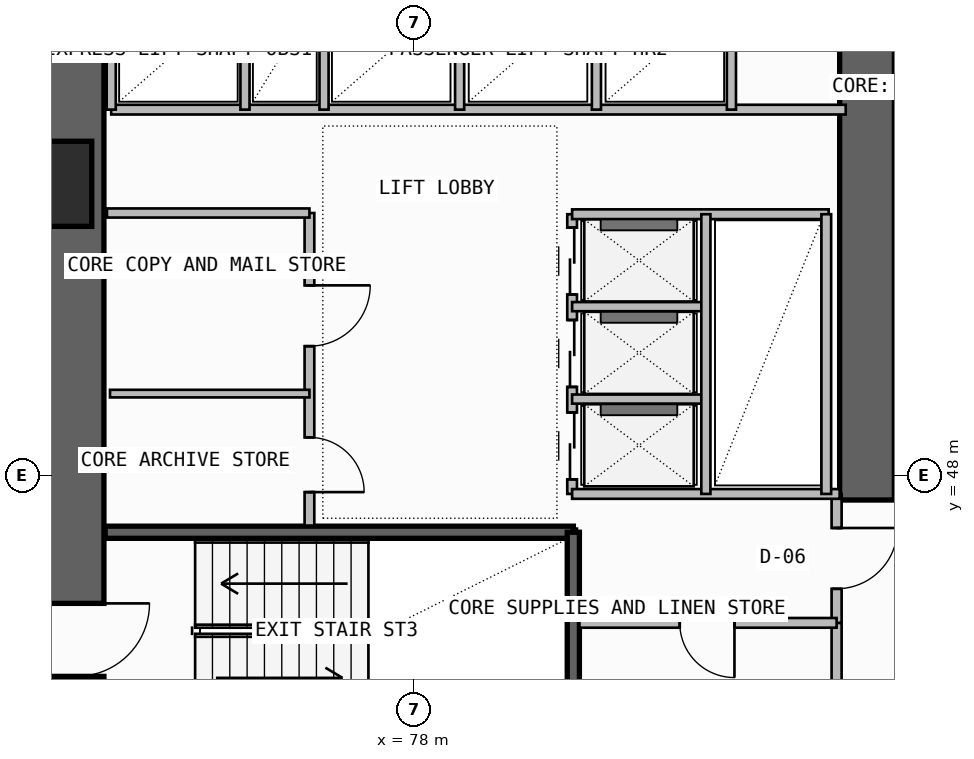
"""IFC4 building model, lengths in metres.
Left out: names, types, materials, properties, quantities, classifications, styles, units other than length and angle.
Written with IfcOpenShell. Run it as: python <this file> out.ifc"""

import sys

from ifc_helpers import new_model, si_unit, direction, frame, frame_2d, origin, origin_2d, place, context, subcontext, project, spatial, rectangle, extrude, element, fill, save


model = new_model("IFC4")
c1 = context("Model", 3, precision=1e-05, world=origin(), true_north=direction((0.0, 1.0)))
c2 = subcontext(c1, "Body", "Model", "MODEL_VIEW")
j1 = project(units=[si_unit("LENGTHUNIT", "METRE"), si_unit("PLANEANGLEUNIT", "RADIAN")], contexts=[c1])
p1 = place(None, origin())
s1 = spatial("IfcSite", under=j1, at=p1, CompositionType="ELEMENT")
p2 = place(p1, origin())
s2 = spatial("IfcBuilding", under=s1, at=p2, CompositionType="ELEMENT")
p3 = place(p2, frame((0.0, 0.0, 157.5)))
s3 = spatial("IfcBuildingStorey", under=s2, at=p3, CompositionType="ELEMENT", Elevation=157.5)
p4 = place(p3, frame((72.45, 43.35, -0.26), z_axis=(0.0, 0.0, 1.0), x_axis=(0.0, 1.0, 0.0)))
e1 = element("IfcWall", 1, at=p4, inside=s3, PredefinedType="SHEAR", context=c2, shape_type="SweptSolid", body=[
    extrude(rectangle(XDim=12.7, YDim=0.9, at=frame_2d((6.35, 0.0))), origin(), (0.0, 0.0, 1.0), 3.6),
])
p5 = place(p4, frame((1.35, 0.0, 0.26)))
e2 = element("IfcOpeningElement", 2, at=p5, cuts=e1, PredefinedType="OPENING", context=c2, shape_type="SweptSolid", body=[
    extrude(rectangle(XDim=1.2, YDim=2.2, at=frame_2d((0.6, 1.1))), frame((0.0, 0.46, 0.0), z_axis=(0.0, -1.0, 0.0), x_axis=(1.0, 0.0, 0.0)), (0.0, 0.0, 1.0), 0.92),
])
p6 = place(p3, frame((85.45, 47.6, -0.26), z_axis=(0.0, 0.0, 1.0), x_axis=(0.0, 1.0, 0.0)))
e3 = element("IfcWall", 3, at=p6, inside=s3, PredefinedType="SHEAR", context=c2, shape_type="SweptSolid", body=[
    extrude(rectangle(XDim=8.45, YDim=0.9, at=frame_2d((4.225, 0.0))), origin(), (0.0, 0.0, 1.0), 3.6),
])
p7 = place(p3, frame((72.0, 52.8, 0.0), z_axis=(0.0, 0.0, 1.0), x_axis=(1.0, 0.0, 0.0)))
e4 = element("IfcColumn", 4, at=p7, inside=s3, PredefinedType="COLUMN", context=c2, shape_type="SweptSolid", body=[
    extrude(rectangle(XDim=1.4, YDim=1.4, at=origin_2d()), origin(), (0.0, 0.0, 1.0), 3.6),
])
p8 = place(p3, frame((72.92, 47.07, -0.26), z_axis=(0.0, 0.0, 1.0), x_axis=(1.0, 0.0, 0.0)))
e5 = element("IfcWall", 5, at=p8, inside=s3, PredefinedType="SOLIDWALL", context=c2, shape_type="SweptSolid", body=[
    extrude(rectangle(XDim=7.7, YDim=0.2, at=frame_2d((3.85, 0.0))), origin(), (0.0, 0.0, 1.0), 3.6),
])
p9 = place(p3, frame((80.62, 43.83, -0.26), z_axis=(0.0, 0.0, 1.0), x_axis=(0.0, 1.0, 0.0)))
e6 = element("IfcWall", 6, at=p9, inside=s3, PredefinedType="SOLIDWALL", context=c2, shape_type="SweptSolid", body=[
    extrude(rectangle(XDim=3.24, YDim=0.2, at=frame_2d((1.62, 0.0))), origin(), (0.0, 0.0, 1.0), 3.6),
])
p10 = place(p3, frame((84.95, 43.68, 0.0), z_axis=(0.0, 0.0, 1.0), x_axis=(0.0, 1.0, 0.0)))
e7 = element("IfcWall", 7, at=p10, inside=s3, PredefinedType="PLUMBINGWALL", context=c2, shape_type="SweptSolid", body=[
    extrude(rectangle(XDim=1.9, YDim=0.165, at=frame_2d((0.95, 0.0))), origin(), (0.0, 0.0, 1.0), 3.34),
])
p11 = place(p3, frame((84.95, 45.58, 0.0), z_axis=(0.0, 0.0, 1.0), x_axis=(0.0, 1.0, 0.0)))
e8 = element("IfcWall", 8, at=p11, inside=s3, PredefinedType="PARTITIONING", context=c2, shape_type="SweptSolid", body=[
    extrude(rectangle(XDim=2.12, YDim=0.165, at=frame_2d((1.06, 0.0))), origin(), (0.0, 0.0, 1.0), 3.34),
])
p12 = place(p11, frame((0.56, 0.0, 0.0)))
e9 = element("IfcOpeningElement", 9, at=p12, cuts=e8, PredefinedType="OPENING", context=c2, shape_type="SweptSolid", body=[
    extrude(rectangle(XDim=1.0, YDim=2.2, at=frame_2d((0.5, 1.1))), frame((0.0, 0.093, 0.0), z_axis=(0.0, -1.0, 0.0), x_axis=(1.0, 0.0, 0.0)), (0.0, 0.0, 1.0), 0.185),
])
p13 = place(p3, frame((80.72, 45.58, 0.0), z_axis=(0.0, 0.0, 1.0), x_axis=(1.0, 0.0, 0.0)))
e10 = element("IfcWall", 10, at=p13, inside=s3, PredefinedType="PLUMBINGWALL", context=c2, shape_type="SweptSolid", body=[
    extrude(rectangle(XDim=4.23, YDim=0.16, at=frame_2d((2.115, 0.0))), origin(), (0.0, 0.0, 1.0), 3.34),
])
p14 = place(p13, frame((1.65, 0.0, 0.0)))
e11 = element("IfcOpeningElement", 11, at=p14, cuts=e10, PredefinedType="OPENING", context=c2, shape_type="SweptSolid", body=[
    extrude(rectangle(XDim=0.9, YDim=2.1, at=frame_2d((0.45, 1.05))), frame((0.0, 0.09, 0.0), z_axis=(0.0, -1.0, 0.0), x_axis=(1.0, 0.0, 0.0)), (0.0, 0.0, 1.0), 0.18),
])
p15 = place(p3, frame((76.28, 47.18, 0.0), z_axis=(0.0, 0.0, 1.0), x_axis=(0.0, 1.0, 0.0)))
e12 = element("IfcWall", 12, at=p15, inside=s3, PredefinedType="SOLIDWALL", context=c2, shape_type="SweptSolid", body=[
    extrude(rectangle(XDim=5.14, YDim=0.16, at=frame_2d((2.57, 0.0))), origin(), (0.0, 0.0, 1.0), 3.34),
])
p16 = place(p15, frame((0.55, 0.0, 0.0)))
e13 = element("IfcOpeningElement", 13, at=p16, cuts=e12, PredefinedType="OPENING", context=c2, shape_type="SweptSolid", body=[
    extrude(rectangle(XDim=0.9, YDim=2.1, at=frame_2d((0.45, 1.05))), frame((0.0, 0.09, 0.0), z_axis=(0.0, -1.0, 0.0), x_axis=(1.0, 0.0, 0.0)), (0.0, 0.0, 1.0), 0.18),
])
p17 = place(p15, frame((2.95, 0.0, 0.0)))
e14 = element("IfcOpeningElement", 14, at=p17, cuts=e12, PredefinedType="OPENING", context=c2, shape_type="SweptSolid", body=[
    extrude(rectangle(XDim=1.0, YDim=2.2, at=frame_2d((0.5, 1.1))), frame((0.0, 0.09, 0.0), z_axis=(0.0, -1.0, 0.0), x_axis=(1.0, 0.0, 0.0)), (0.0, 0.0, 1.0), 0.18),
])
p18 = place(p3, frame((72.95, 52.32, 0.0), z_axis=(0.0, 0.0, 1.0), x_axis=(1.0, 0.0, 0.0)))
e15 = element("IfcWall", 15, at=p18, inside=s3, PredefinedType="SOLIDWALL", context=c2, shape_type="SweptSolid", body=[
    extrude(rectangle(XDim=3.33, YDim=0.15, at=frame_2d((1.665, 0.0))), origin(), (0.0, 0.0, 1.0), 3.34),
])
p19 = place(p3, frame((73.0, 49.35, 0.0), z_axis=(0.0, 0.0, 1.0), x_axis=(1.0, 0.0, 0.0)))
e16 = element("IfcWall", 16, at=p19, inside=s3, PredefinedType="PARTITIONING", context=c2, shape_type="SweptSolid", body=[
    extrude(rectangle(XDim=3.28, YDim=0.125, at=frame_2d((1.64, 0.0))), origin(), (0.0, 0.0, 1.0), 3.34),
])
p20 = place(p3, frame((80.6, 47.7, 0.0), z_axis=(0.0, 0.0, 1.0), x_axis=(0.0, 1.0, 0.0)))
e17 = element("IfcWall", 17, at=p20, inside=s3, PredefinedType="SOLIDWALL", context=c2, shape_type="SweptSolid", body=[
    extrude(rectangle(XDim=4.6, YDim=0.16, at=frame_2d((2.3, 0.0))), origin(), (0.0, 0.0, 1.0), 3.34),
])
p21 = place(p20, frame((0.24, 0.0, 0.0)))
e18 = element("IfcOpeningElement", 18, at=p21, cuts=e17, PredefinedType="OPENING", context=c2, shape_type="SweptSolid", body=[
    extrude(rectangle(XDim=1.1, YDim=2.25, at=frame_2d((0.55, 1.125))), frame((0.0, 0.09, 0.0), z_axis=(0.0, -1.0, 0.0), x_axis=(1.0, 0.0, 0.0)), (0.0, 0.0, 1.0), 0.18),
])
p22 = place(p20, frame((1.76, 0.0, 0.0)))
e19 = element("IfcOpeningElement", 19, at=p22, cuts=e17, PredefinedType="OPENING", context=c2, shape_type="SweptSolid", body=[
    extrude(rectangle(XDim=1.1, YDim=2.25, at=frame_2d((0.55, 1.125))), frame((0.0, 0.09, 0.0), z_axis=(0.0, -1.0, 0.0), x_axis=(1.0, 0.0, 0.0)), (0.0, 0.0, 1.0), 0.18),
])
p23 = place(p20, frame((3.28, 0.0, 0.0)))
e20 = element("IfcOpeningElement", 20, at=p23, cuts=e17, PredefinedType="OPENING", context=c2, shape_type="SweptSolid", body=[
    extrude(rectangle(XDim=1.1, YDim=2.25, at=frame_2d((0.55, 1.125))), frame((0.0, 0.09, 0.0), z_axis=(0.0, -1.0, 0.0), x_axis=(1.0, 0.0, 0.0)), (0.0, 0.0, 1.0), 0.18),
])
p24 = place(p3, frame((80.6, 47.7, 0.0), z_axis=(0.0, 0.0, 1.0), x_axis=(1.0, 0.0, 0.0)))
e21 = element("IfcWall", 21, at=p24, inside=s3, PredefinedType="SOLIDWALL", context=c2, shape_type="SweptSolid", body=[
    extrude(rectangle(XDim=4.4, YDim=0.16, at=frame_2d((2.2, 0.0))), origin(), (0.0, 0.0, 1.0), 3.34),
])
p25 = place(p3, frame((80.6, 52.3, 0.0), z_axis=(0.0, 0.0, 1.0), x_axis=(1.0, 0.0, 0.0)))
e22 = element("IfcWall", 22, at=p25, inside=s3, PredefinedType="SOLIDWALL", context=c2, shape_type="SweptSolid", body=[
    extrude(rectangle(XDim=4.22, YDim=0.16, at=frame_2d((2.11, 0.0))), origin(), (0.0, 0.0, 1.0), 3.34),
])
for number, where, z_axis, x_axis in (
    (23, (80.6, 49.26, 0.0), (0.0, 0.0, 1.0), (1.0, 0.0, 0.0)),
    (24, (80.6, 50.78, 0.0), (0.0, 0.0, 1.0), (1.0, 0.0, 0.0)),
):
    element("IfcWall", number, at=place(p3, frame(where, z_axis=z_axis, x_axis=x_axis)), inside=s3, PredefinedType="PLUMBINGWALL", context=c2, shape_type="SweptSolid", body=[
        extrude(rectangle(XDim=2.2, YDim=0.15, at=frame_2d((1.1, 0.0))), origin(), (0.0, 0.0, 1.0), 3.34),
    ])
p26 = place(p3, frame((82.8, 47.7, 0.0), z_axis=(0.0, 0.0, 1.0), x_axis=(0.0, 1.0, 0.0)))
e25 = element("IfcWall", 25, at=p26, inside=s3, PredefinedType="PLUMBINGWALL", context=c2, shape_type="SweptSolid", body=[
    extrude(rectangle(XDim=4.6, YDim=0.15, at=frame_2d((2.3, 0.0))), origin(), (0.0, 0.0, 1.0), 3.34),
])
p27 = place(p3, frame((84.78, 47.7, 0.0), z_axis=(0.0, 0.0, 1.0), x_axis=(0.0, 1.0, 0.0)))
e26 = element("IfcWall", 26, at=p27, inside=s3, PredefinedType="SOLIDWALL", context=c2, shape_type="SweptSolid", body=[
    extrude(rectangle(XDim=4.6, YDim=0.16, at=frame_2d((2.3, 0.0))), origin(), (0.0, 0.0, 1.0), 3.34),
])
p28 = place(p3, frame((73.02, 54.02, 0.0), z_axis=(0.0, 0.0, 1.0), x_axis=(1.0, 0.0, 0.0)))
e27 = element("IfcWall", 27, at=p28, inside=s3, PredefinedType="SOLIDWALL", context=c2, shape_type="SweptSolid", body=[
    extrude(rectangle(XDim=12.08, YDim=0.16, at=frame_2d((6.04, 0.0))), origin(), (0.0, 0.0, 1.0), 3.34),
])
p29 = place(p3, frame((73.02, 54.02, 0.0), z_axis=(0.0, 0.0, 1.0), x_axis=(0.0, 1.0, 0.0)))
e28 = element("IfcWall", 28, at=p29, inside=s3, PredefinedType="PLUMBINGWALL", context=c2, shape_type="SweptSolid", body=[
    extrude(rectangle(XDim=1.94, YDim=0.15, at=frame_2d((0.97, 0.0))), origin(), (0.0, 0.0, 1.0), 3.34),
])
p30 = place(p3, frame((76.52, 54.02, 0.0), z_axis=(0.0, 0.0, 1.0), x_axis=(0.0, 1.0, 0.0)))
e29 = element("IfcWall", 29, at=p30, inside=s3, PredefinedType="SOLIDWALL", context=c2, shape_type="SweptSolid", body=[
    extrude(rectangle(XDim=1.94, YDim=0.15, at=frame_2d((0.97, 0.0))), origin(), (0.0, 0.0, 1.0), 3.34),
])
p31 = place(p3, frame((75.22, 54.02, 0.0), z_axis=(0.0, 0.0, 1.0), x_axis=(0.0, 1.0, 0.0)))
e30 = element("IfcWall", 30, at=p31, inside=s3, PredefinedType="PLUMBINGWALL", context=c2, shape_type="SweptSolid", body=[
    extrude(rectangle(XDim=1.94, YDim=0.15, at=frame_2d((0.97, 0.0))), origin(), (0.0, 0.0, 1.0), 3.34),
])
for number, where, z_axis, x_axis in (
    (31, (78.75, 54.02, 0.0), (0.0, 0.0, 1.0), (0.0, 1.0, 0.0)),
    (32, (81.0, 54.02, 0.0), (0.0, 0.0, 1.0), (0.0, 1.0, 0.0)),
):
    element("IfcWall", number, at=place(p3, frame(where, z_axis=z_axis, x_axis=x_axis)), inside=s3, PredefinedType="PLUMBINGWALL", context=c2, shape_type="SweptSolid", body=[
        extrude(rectangle(XDim=1.96, YDim=0.15, at=frame_2d((0.98, 0.0))), origin(), (0.0, 0.0, 1.0), 3.34),
    ])
p32 = place(p3, frame((83.22, 54.02, 0.0), z_axis=(0.0, 0.0, 1.0), x_axis=(0.0, 1.0, 0.0)))
e33 = element("IfcWall", 33, at=p32, inside=s3, PredefinedType="SOLIDWALL", context=c2, shape_type="SweptSolid", body=[
    extrude(rectangle(XDim=1.96, YDim=0.15, at=frame_2d((0.98, 0.0))), origin(), (0.0, 0.0, 1.0), 3.34),
])
p33 = place(p5, frame((1.2, 0.0, 0.0), z_axis=(0.0, 0.0, 1.0), x_axis=(-1.0, 0.0, 0.0)))
e34 = element("IfcDoor", 34, at=p33, inside=s3, OperationType="SINGLE_SWING_LEFT", PredefinedType="USERDEFINED", context=c2, shape_type="SweptSolid", body=[
    extrude(rectangle(XDim=1.2, YDim=2.2, at=frame_2d((0.6, 1.1))), frame((0.0, 0.025, 0.0), z_axis=(0.0, -1.0, 0.0), x_axis=(1.0, 0.0, 0.0)), (0.0, 0.0, 1.0), 0.05),
])
fill(e2, e34)
p34 = place(p12, frame((1.0, 0.0, 0.0), z_axis=(0.0, 0.0, 1.0), x_axis=(-1.0, 0.0, 0.0)))
e35 = element("IfcDoor", 35, at=p34, inside=s3, OperationType="SINGLE_SWING_LEFT", PredefinedType="DOOR", context=c2, shape_type="SweptSolid", body=[
    extrude(rectangle(XDim=1.0, YDim=2.2, at=frame_2d((0.5, 1.1))), frame((0.0, 0.025, 0.0), z_axis=(0.0, -1.0, 0.0), x_axis=(1.0, 0.0, 0.0)), (0.0, 0.0, 1.0), 0.05),
])
fill(e9, e35)
p35 = place(p14, frame((0.9, 0.0, 0.0), z_axis=(0.0, 0.0, 1.0), x_axis=(-1.0, 0.0, 0.0)))
e36 = element("IfcDoor", 36, at=p35, inside=s3, OperationType="SINGLE_SWING_LEFT", PredefinedType="DOOR", context=c2, shape_type="SweptSolid", body=[
    extrude(rectangle(XDim=0.9, YDim=2.1, at=frame_2d((0.45, 1.05))), frame((0.0, 0.025, 0.0), z_axis=(0.0, -1.0, 0.0), x_axis=(1.0, 0.0, 0.0)), (0.0, 0.0, 1.0), 0.05),
])
fill(e11, e36)
p36 = place(p16, frame((0.9, 0.0, 0.0), z_axis=(0.0, 0.0, 1.0), x_axis=(-1.0, 0.0, 0.0)))
e37 = element("IfcDoor", 37, at=p36, inside=s3, OperationType="SINGLE_SWING_RIGHT", PredefinedType="DOOR", context=c2, shape_type="SweptSolid", body=[
    extrude(rectangle(XDim=0.9, YDim=2.1, at=frame_2d((0.45, 1.05))), frame((0.0, 0.025, 0.0), z_axis=(0.0, -1.0, 0.0), x_axis=(1.0, 0.0, 0.0)), (0.0, 0.0, 1.0), 0.05),
])
fill(e13, e37)
p37 = place(p17, frame((1.0, 0.0, 0.0), z_axis=(0.0, 0.0, 1.0), x_axis=(-1.0, 0.0, 0.0)))
e38 = element("IfcDoor", 38, at=p37, inside=s3, OperationType="SINGLE_SWING_LEFT", PredefinedType="DOOR", context=c2, shape_type="SweptSolid", body=[
    extrude(rectangle(XDim=1.0, YDim=2.2, at=frame_2d((0.5, 1.1))), frame((0.0, 0.025, 0.0), z_axis=(0.0, -1.0, 0.0), x_axis=(1.0, 0.0, 0.0)), (0.0, 0.0, 1.0), 0.05),
])
fill(e14, e38)
p38 = place(p21, frame((1.1, 0.0, 0.0), z_axis=(0.0, 0.0, 1.0), x_axis=(-1.0, 0.0, 0.0)))
e39 = element("IfcDoor", 39, at=p38, inside=s3, OperationType="DOUBLE_DOOR_SLIDING", PredefinedType="DOOR", context=c2, shape_type="SweptSolid", body=[
    extrude(rectangle(XDim=1.1, YDim=2.25, at=frame_2d((0.55, 1.125))), frame((0.0, 0.025, 0.0), z_axis=(0.0, -1.0, 0.0), x_axis=(1.0, 0.0, 0.0)), (0.0, 0.0, 1.0), 0.05),
])
fill(e18, e39)
p39 = place(p22, frame((1.1, 0.0, 0.0), z_axis=(0.0, 0.0, 1.0), x_axis=(-1.0, 0.0, 0.0)))
e40 = element("IfcDoor", 40, at=p39, inside=s3, OperationType="DOUBLE_DOOR_SLIDING", PredefinedType="DOOR", context=c2, shape_type="SweptSolid", body=[
    extrude(rectangle(XDim=1.1, YDim=2.25, at=frame_2d((0.55, 1.125))), frame((0.0, 0.025, 0.0), z_axis=(0.0, -1.0, 0.0), x_axis=(1.0, 0.0, 0.0)), (0.0, 0.0, 1.0), 0.05),
])
fill(e19, e40)
p40 = place(p23, frame((1.1, 0.0, 0.0), z_axis=(0.0, 0.0, 1.0), x_axis=(-1.0, 0.0, 0.0)))
e41 = element("IfcDoor", 41, at=p40, inside=s3, OperationType="DOUBLE_DOOR_SLIDING", PredefinedType="DOOR", context=c2, shape_type="SweptSolid", body=[
    extrude(rectangle(XDim=1.1, YDim=2.25, at=frame_2d((0.55, 1.125))), frame((0.0, 0.025, 0.0), z_axis=(0.0, -1.0, 0.0), x_axis=(1.0, 0.0, 0.0)), (0.0, 0.0, 1.0), 0.05),
])
fill(e20, e41)
save(model, sys.argv[1])
